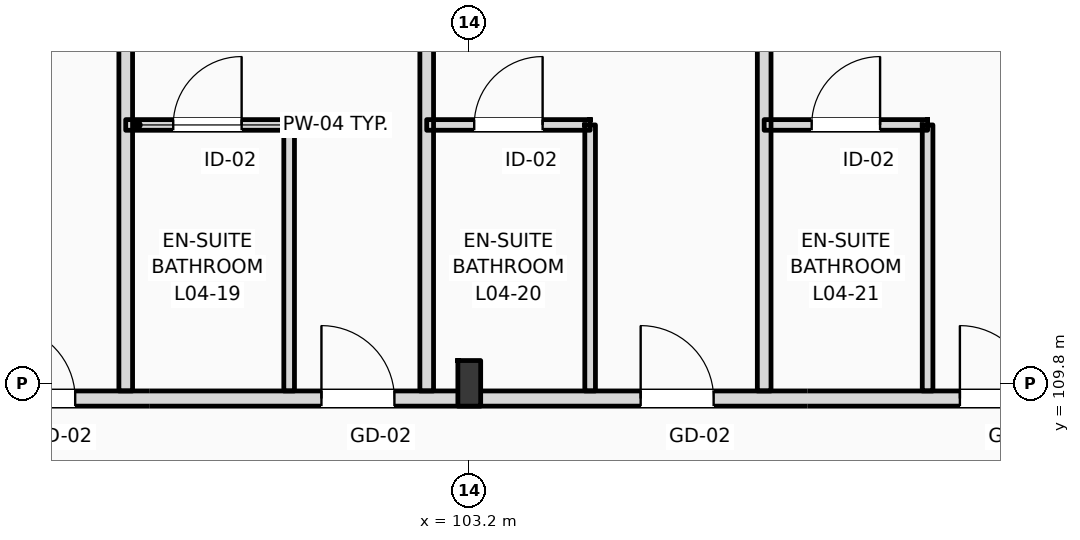
"""IFC4 building model, lengths in metres.
Left out: names, types, materials, properties, quantities, classifications, styles, units other than length and angle.
Written with IfcOpenShell. Run it as: python <this file> out.ifc"""

import sys

from ifc_helpers import new_model, si_unit, direction, frame, frame_2d, origin, origin_2d, place, context, subcontext, project, spatial, rectangle, i_section, extrude, element, fill, save


model = new_model("IFC4")
c1 = context("Model", 3, precision=1e-05, world=origin(), true_north=direction((0.0, 1.0)))
c2 = subcontext(c1, "Body", "Model", "MODEL_VIEW")
j1 = project(units=[si_unit("LENGTHUNIT", "METRE"), si_unit("PLANEANGLEUNIT", "RADIAN")], contexts=[c1])
p1 = place(None, origin())
s1 = spatial("IfcSite", under=j1, at=p1, CompositionType="ELEMENT")
p2 = place(p1, origin())
s2 = spatial("IfcBuilding", under=s1, at=p2, CompositionType="ELEMENT")
p3 = place(p2, frame((0.0, 0.0, 20.4)))
s3 = spatial("IfcBuildingStorey", under=s2, at=p3, CompositionType="ELEMENT", Elevation=20.4)
p4 = place(p3, frame((103.2, 109.8, 0.0), z_axis=(0.0, 0.0, 1.0), x_axis=(1.0, 0.0, 0.0)))
e1 = element("IfcColumn", 1, at=p4, inside=s3, PredefinedType="COLUMN", context=c2, shape_type="SweptSolid", body=[
    extrude(i_section(OverallWidth=0.3, OverallDepth=0.6, WebThickness=0.015, FlangeThickness=0.03, FilletRadius=0.027, at=origin_2d()), origin(), (0.0, 0.0, 1.0), 4.2),
])
p5 = place(p3, frame((10.65, 109.6, 0.0), z_axis=(0.0, 0.0, 1.0), x_axis=(1.0, 0.0, 0.0)))
e2 = element("IfcWall", 2, at=p5, inside=s3, PredefinedType="PARTITIONING", context=c2, shape_type="SweptSolid", body=[
    extrude(rectangle(XDim=109.21, YDim=0.2, at=frame_2d((54.605, 0.0))), origin(), (0.0, 0.0, 1.0), 3.38),
])
p6 = place(p5, frame((12.535, 0.0, 0.0)))
e3 = element("IfcOpeningElement", 3, at=p6, cuts=e2, PredefinedType="OPENING", context=c2, shape_type="SweptSolid", body=[
    extrude(rectangle(XDim=1.02, YDim=2.2, at=frame_2d((0.51, 1.1))), frame((0.0, 0.11, 0.0), z_axis=(0.0, -1.0, 0.0), x_axis=(1.0, 0.0, 0.0)), (0.0, 0.0, 1.0), 0.22),
])
p7 = place(p5, frame((19.175, 0.0, 0.0)))
e4 = element("IfcOpeningElement", 4, at=p7, cuts=e2, PredefinedType="OPENING", context=c2, shape_type="SweptSolid", body=[
    extrude(rectangle(XDim=1.02, YDim=2.2, at=frame_2d((0.51, 1.1))), frame((0.0, 0.11, 0.0), z_axis=(0.0, -1.0, 0.0), x_axis=(1.0, 0.0, 0.0)), (0.0, 0.0, 1.0), 0.22),
])
p8 = place(p5, frame((23.375, 0.0, 0.0)))
e5 = element("IfcOpeningElement", 5, at=p8, cuts=e2, PredefinedType="OPENING", context=c2, shape_type="SweptSolid", body=[
    extrude(rectangle(XDim=1.02, YDim=2.2, at=frame_2d((0.51, 1.1))), frame((0.0, 0.11, 0.0), z_axis=(0.0, -1.0, 0.0), x_axis=(1.0, 0.0, 0.0)), (0.0, 0.0, 1.0), 0.22),
])
p9 = place(p5, frame((27.575, 0.0, 0.0)))
e6 = element("IfcOpeningElement", 6, at=p9, cuts=e2, PredefinedType="OPENING", context=c2, shape_type="SweptSolid", body=[
    extrude(rectangle(XDim=1.02, YDim=2.2, at=frame_2d((0.51, 1.1))), frame((0.0, 0.11, 0.0), z_axis=(0.0, -1.0, 0.0), x_axis=(1.0, 0.0, 0.0)), (0.0, 0.0, 1.0), 0.22),
])
p10 = place(p5, frame((31.805, 0.0, 0.0)))
e7 = element("IfcOpeningElement", 7, at=p10, cuts=e2, PredefinedType="OPENING", context=c2, shape_type="SweptSolid", body=[
    extrude(rectangle(XDim=0.96, YDim=2.2, at=frame_2d((0.48, 1.1))), frame((0.0, 0.11, 0.0), z_axis=(0.0, -1.0, 0.0), x_axis=(1.0, 0.0, 0.0)), (0.0, 0.0, 1.0), 0.22),
])
p11 = place(p5, frame((33.855, 0.0, 0.0)))
e8 = element("IfcOpeningElement", 8, at=p11, cuts=e2, PredefinedType="OPENING", context=c2, shape_type="SweptSolid", body=[
    extrude(rectangle(XDim=0.96, YDim=2.2, at=frame_2d((0.48, 1.1))), frame((0.0, 0.11, 0.0), z_axis=(0.0, -1.0, 0.0), x_axis=(1.0, 0.0, 0.0)), (0.0, 0.0, 1.0), 0.22),
])
p12 = place(p5, frame((40.205, 0.0, 0.0)))
e9 = element("IfcOpeningElement", 9, at=p12, cuts=e2, PredefinedType="OPENING", context=c2, shape_type="SweptSolid", body=[
    extrude(rectangle(XDim=0.96, YDim=2.2, at=frame_2d((0.48, 1.1))), frame((0.0, 0.11, 0.0), z_axis=(0.0, -1.0, 0.0), x_axis=(1.0, 0.0, 0.0)), (0.0, 0.0, 1.0), 0.22),
])
p13 = place(p5, frame((42.255, 0.0, 0.0)))
e10 = element("IfcOpeningElement", 10, at=p13, cuts=e2, PredefinedType="OPENING", context=c2, shape_type="SweptSolid", body=[
    extrude(rectangle(XDim=0.96, YDim=2.2, at=frame_2d((0.48, 1.1))), frame((0.0, 0.11, 0.0), z_axis=(0.0, -1.0, 0.0), x_axis=(1.0, 0.0, 0.0)), (0.0, 0.0, 1.0), 0.22),
])
p14 = place(p5, frame((48.605, 0.0, 0.0)))
e11 = element("IfcOpeningElement", 11, at=p14, cuts=e2, PredefinedType="OPENING", context=c2, shape_type="SweptSolid", body=[
    extrude(rectangle(XDim=0.96, YDim=2.2, at=frame_2d((0.48, 1.1))), frame((0.0, 0.11, 0.0), z_axis=(0.0, -1.0, 0.0), x_axis=(1.0, 0.0, 0.0)), (0.0, 0.0, 1.0), 0.22),
])
p15 = place(p5, frame((50.655, 0.0, 0.0)))
e12 = element("IfcOpeningElement", 12, at=p15, cuts=e2, PredefinedType="OPENING", context=c2, shape_type="SweptSolid", body=[
    extrude(rectangle(XDim=0.96, YDim=2.2, at=frame_2d((0.48, 1.1))), frame((0.0, 0.11, 0.0), z_axis=(0.0, -1.0, 0.0), x_axis=(1.0, 0.0, 0.0)), (0.0, 0.0, 1.0), 0.22),
])
p16 = place(p5, frame((57.005, 0.0, 0.0)))
e13 = element("IfcOpeningElement", 13, at=p16, cuts=e2, PredefinedType="OPENING", context=c2, shape_type="SweptSolid", body=[
    extrude(rectangle(XDim=0.96, YDim=2.2, at=frame_2d((0.48, 1.1))), frame((0.0, 0.11, 0.0), z_axis=(0.0, -1.0, 0.0), x_axis=(1.0, 0.0, 0.0)), (0.0, 0.0, 1.0), 0.22),
])
p17 = place(p5, frame((59.055, 0.0, 0.0)))
e14 = element("IfcOpeningElement", 14, at=p17, cuts=e2, PredefinedType="OPENING", context=c2, shape_type="SweptSolid", body=[
    extrude(rectangle(XDim=0.96, YDim=2.2, at=frame_2d((0.48, 1.1))), frame((0.0, 0.11, 0.0), z_axis=(0.0, -1.0, 0.0), x_axis=(1.0, 0.0, 0.0)), (0.0, 0.0, 1.0), 0.22),
])
p18 = place(p5, frame((65.405, 0.0, 0.0)))
e15 = element("IfcOpeningElement", 15, at=p18, cuts=e2, PredefinedType="OPENING", context=c2, shape_type="SweptSolid", body=[
    extrude(rectangle(XDim=0.96, YDim=2.2, at=frame_2d((0.48, 1.1))), frame((0.0, 0.11, 0.0), z_axis=(0.0, -1.0, 0.0), x_axis=(1.0, 0.0, 0.0)), (0.0, 0.0, 1.0), 0.22),
])
p19 = place(p5, frame((67.205, 0.0, 0.0)))
e16 = element("IfcOpeningElement", 16, at=p19, cuts=e2, PredefinedType="OPENING", context=c2, shape_type="SweptSolid", body=[
    extrude(rectangle(XDim=0.96, YDim=2.2, at=frame_2d((0.48, 1.1))), frame((0.0, 0.11, 0.0), z_axis=(0.0, -1.0, 0.0), x_axis=(1.0, 0.0, 0.0)), (0.0, 0.0, 1.0), 0.22),
])
p20 = place(p5, frame((73.805, 0.0, 0.0)))
e17 = element("IfcOpeningElement", 17, at=p20, cuts=e2, PredefinedType="OPENING", context=c2, shape_type="SweptSolid", body=[
    extrude(rectangle(XDim=0.96, YDim=2.2, at=frame_2d((0.48, 1.1))), frame((0.0, 0.11, 0.0), z_axis=(0.0, -1.0, 0.0), x_axis=(1.0, 0.0, 0.0)), (0.0, 0.0, 1.0), 0.22),
])
p21 = place(p5, frame((78.255, 0.0, 0.0)))
e18 = element("IfcOpeningElement", 18, at=p21, cuts=e2, PredefinedType="OPENING", context=c2, shape_type="SweptSolid", body=[
    extrude(rectangle(XDim=0.96, YDim=2.2, at=frame_2d((0.48, 1.1))), frame((0.0, 0.11, 0.0), z_axis=(0.0, -1.0, 0.0), x_axis=(1.0, 0.0, 0.0)), (0.0, 0.0, 1.0), 0.22),
])
p22 = place(p5, frame((82.205, 0.0, 0.0)))
e19 = element("IfcOpeningElement", 19, at=p22, cuts=e2, PredefinedType="OPENING", context=c2, shape_type="SweptSolid", body=[
    extrude(rectangle(XDim=0.96, YDim=2.2, at=frame_2d((0.48, 1.1))), frame((0.0, 0.11, 0.0), z_axis=(0.0, -1.0, 0.0), x_axis=(1.0, 0.0, 0.0)), (0.0, 0.0, 1.0), 0.22),
])
p23 = place(p5, frame((86.405, 0.0, 0.0)))
e20 = element("IfcOpeningElement", 20, at=p23, cuts=e2, PredefinedType="OPENING", context=c2, shape_type="SweptSolid", body=[
    extrude(rectangle(XDim=0.96, YDim=2.2, at=frame_2d((0.48, 1.1))), frame((0.0, 0.11, 0.0), z_axis=(0.0, -1.0, 0.0), x_axis=(1.0, 0.0, 0.0)), (0.0, 0.0, 1.0), 0.22),
])
p24 = place(p5, frame((90.605, 0.0, 0.0)))
e21 = element("IfcOpeningElement", 21, at=p24, cuts=e2, PredefinedType="OPENING", context=c2, shape_type="SweptSolid", body=[
    extrude(rectangle(XDim=0.96, YDim=2.2, at=frame_2d((0.48, 1.1))), frame((0.0, 0.11, 0.0), z_axis=(0.0, -1.0, 0.0), x_axis=(1.0, 0.0, 0.0)), (0.0, 0.0, 1.0), 0.22),
])
p25 = place(p5, frame((94.805, 0.0, 0.0)))
e22 = element("IfcOpeningElement", 22, at=p25, cuts=e2, PredefinedType="OPENING", context=c2, shape_type="SweptSolid", body=[
    extrude(rectangle(XDim=0.96, YDim=2.2, at=frame_2d((0.48, 1.1))), frame((0.0, 0.11, 0.0), z_axis=(0.0, -1.0, 0.0), x_axis=(1.0, 0.0, 0.0)), (0.0, 0.0, 1.0), 0.22),
])
p26 = place(p5, frame((99.005, 0.0, 0.0)))
e23 = element("IfcOpeningElement", 23, at=p26, cuts=e2, PredefinedType="OPENING", context=c2, shape_type="SweptSolid", body=[
    extrude(rectangle(XDim=0.96, YDim=2.2, at=frame_2d((0.48, 1.1))), frame((0.0, 0.11, 0.0), z_axis=(0.0, -1.0, 0.0), x_axis=(1.0, 0.0, 0.0)), (0.0, 0.0, 1.0), 0.22),
])
p27 = place(p5, frame((103.205, 0.0, 0.0)))
e24 = element("IfcOpeningElement", 24, at=p27, cuts=e2, PredefinedType="OPENING", context=c2, shape_type="SweptSolid", body=[
    extrude(rectangle(XDim=0.96, YDim=2.2, at=frame_2d((0.48, 1.1))), frame((0.0, 0.11, 0.0), z_axis=(0.0, -1.0, 0.0), x_axis=(1.0, 0.0, 0.0)), (0.0, 0.0, 1.0), 0.22),
])
p28 = place(p5, frame((105.335, 0.0, 0.0)))
e25 = element("IfcOpeningElement", 25, at=p28, cuts=e2, PredefinedType="OPENING", context=c2, shape_type="SweptSolid", body=[
    extrude(rectangle(XDim=0.96, YDim=2.2, at=frame_2d((0.48, 1.1))), frame((0.0, 0.11, 0.0), z_axis=(0.0, -1.0, 0.0), x_axis=(1.0, 0.0, 0.0)), (0.0, 0.0, 1.0), 0.22),
])
p29 = place(p5, frame((2.716, 0.0, 0.0)))
e26 = element("IfcOpeningElement", 26, at=p29, cuts=e2, PredefinedType="OPENING", context=c2, shape_type="SweptSolid", body=[
    extrude(rectangle(XDim=1.35, YDim=2.25, at=frame_2d((0.675, 1.125))), frame((0.0, 0.11, 0.0), z_axis=(0.0, -1.0, 0.0), x_axis=(1.0, 0.0, 0.0)), (0.0, 0.0, 1.0), 0.22),
])
p30 = place(p5, frame((6.65, 0.0, 0.0)))
e27 = element("IfcOpeningElement", 27, at=p30, cuts=e2, PredefinedType="OPENING", context=c2, shape_type="SweptSolid", body=[
    extrude(rectangle(XDim=1.35, YDim=2.25, at=frame_2d((0.675, 1.125))), frame((0.0, 0.11, 0.0), z_axis=(0.0, -1.0, 0.0), x_axis=(1.0, 0.0, 0.0)), (0.0, 0.0, 1.0), 0.22),
])
p31 = place(p5, frame((10.583, 0.0, 0.0)))
e28 = element("IfcOpeningElement", 28, at=p31, cuts=e2, PredefinedType="OPENING", context=c2, shape_type="SweptSolid", body=[
    extrude(rectangle(XDim=1.35, YDim=2.25, at=frame_2d((0.675, 1.125))), frame((0.0, 0.11, 0.0), z_axis=(0.0, -1.0, 0.0), x_axis=(1.0, 0.0, 0.0)), (0.0, 0.0, 1.0), 0.22),
])
for number, where, z_axis, x_axis in (
    (29, (98.68, 109.7, 0.0), (0.0, 0.0, 1.0), (0.0, 1.0, 0.0)),
    (30, (102.64, 109.7, 0.0), (0.0, 0.0, 1.0), (0.0, 1.0, 0.0)),
):
    element("IfcWall", number, at=place(p3, frame(where, z_axis=z_axis, x_axis=x_axis)), inside=s3, PredefinedType="PARTITIONING", context=c2, shape_type="SweptSolid", body=[
        extrude(rectangle(XDim=8.15, YDim=0.18, at=frame_2d((4.075, 0.0))), origin(), (0.0, 0.0, 1.0), 3.94),
    ])
p32 = place(p3, frame((100.83, 109.7, 0.0), z_axis=(0.0, 0.0, 1.0), x_axis=(0.0, 1.0, 0.0)))
e31 = element("IfcWall", 31, at=p32, inside=s3, PredefinedType="PARTITIONING", context=c2, shape_type="SweptSolid", body=[
    extrude(rectangle(XDim=3.5, YDim=0.14, at=frame_2d((1.75, 0.0))), origin(), (0.0, 0.0, 1.0), 3.94),
])
p33 = place(p3, frame((98.68, 113.2, 0.0), z_axis=(0.0, 0.0, 1.0), x_axis=(1.0, 0.0, 0.0)))
e32 = element("IfcWall", 32, at=p33, inside=s3, PredefinedType="PARTITIONING", context=c2, shape_type="SweptSolid", body=[
    extrude(rectangle(XDim=2.15, YDim=0.14, at=frame_2d((1.075, 0.0))), origin(), (0.0, 0.0, 1.0), 3.94),
])
p34 = place(p33, frame((0.625, 0.0, 0.0)))
e33 = element("IfcOpeningElement", 33, at=p34, cuts=e32, PredefinedType="OPENING", context=c2, shape_type="SweptSolid", body=[
    extrude(rectangle(XDim=0.9, YDim=2.1, at=frame_2d((0.45, 1.05))), frame((0.0, 0.08, 0.0), z_axis=(0.0, -1.0, 0.0), x_axis=(1.0, 0.0, 0.0)), (0.0, 0.0, 1.0), 0.16),
])
p35 = place(p3, frame((107.08, 109.7, 0.0), z_axis=(0.0, 0.0, 1.0), x_axis=(0.0, 1.0, 0.0)))
e34 = element("IfcWall", 34, at=p35, inside=s3, PredefinedType="PARTITIONING", context=c2, shape_type="SweptSolid", body=[
    extrude(rectangle(XDim=8.15, YDim=0.18, at=frame_2d((4.075, 0.0))), origin(), (0.0, 0.0, 1.0), 3.94),
])
p36 = place(p3, frame((104.79, 109.7, 0.0), z_axis=(0.0, 0.0, 1.0), x_axis=(0.0, 1.0, 0.0)))
e35 = element("IfcWall", 35, at=p36, inside=s3, PredefinedType="PARTITIONING", context=c2, shape_type="SweptSolid", body=[
    extrude(rectangle(XDim=3.5, YDim=0.14, at=frame_2d((1.75, 0.0))), origin(), (0.0, 0.0, 1.0), 3.94),
])
p37 = place(p3, frame((102.64, 113.2, 0.0), z_axis=(0.0, 0.0, 1.0), x_axis=(1.0, 0.0, 0.0)))
e36 = element("IfcWall", 36, at=p37, inside=s3, PredefinedType="PARTITIONING", context=c2, shape_type="SweptSolid", body=[
    extrude(rectangle(XDim=2.15, YDim=0.14, at=frame_2d((1.075, 0.0))), origin(), (0.0, 0.0, 1.0), 3.94),
])
p38 = place(p37, frame((0.625, 0.0, 0.0)))
e37 = element("IfcOpeningElement", 37, at=p38, cuts=e36, PredefinedType="OPENING", context=c2, shape_type="SweptSolid", body=[
    extrude(rectangle(XDim=0.9, YDim=2.1, at=frame_2d((0.45, 1.05))), frame((0.0, 0.08, 0.0), z_axis=(0.0, -1.0, 0.0), x_axis=(1.0, 0.0, 0.0)), (0.0, 0.0, 1.0), 0.16),
])
p39 = place(p3, frame((109.23, 109.7, 0.0), z_axis=(0.0, 0.0, 1.0), x_axis=(0.0, 1.0, 0.0)))
e38 = element("IfcWall", 38, at=p39, inside=s3, PredefinedType="PARTITIONING", context=c2, shape_type="SweptSolid", body=[
    extrude(rectangle(XDim=3.5, YDim=0.14, at=frame_2d((1.75, 0.0))), origin(), (0.0, 0.0, 1.0), 3.94),
])
p40 = place(p3, frame((107.08, 113.2, 0.0), z_axis=(0.0, 0.0, 1.0), x_axis=(1.0, 0.0, 0.0)))
e39 = element("IfcWall", 39, at=p40, inside=s3, PredefinedType="PARTITIONING", context=c2, shape_type="SweptSolid", body=[
    extrude(rectangle(XDim=2.15, YDim=0.14, at=frame_2d((1.075, 0.0))), origin(), (0.0, 0.0, 1.0), 3.94),
])
p41 = place(p40, frame((0.625, 0.0, 0.0)))
e40 = element("IfcOpeningElement", 40, at=p41, cuts=e39, PredefinedType="OPENING", context=c2, shape_type="SweptSolid", body=[
    extrude(rectangle(XDim=0.9, YDim=2.1, at=frame_2d((0.45, 1.05))), frame((0.0, 0.08, 0.0), z_axis=(0.0, -1.0, 0.0), x_axis=(1.0, 0.0, 0.0)), (0.0, 0.0, 1.0), 0.16),
])
p42 = place(p23, origin())
e41 = element("IfcDoor", 41, at=p42, inside=s3, OperationType="SINGLE_SWING_LEFT", PredefinedType="DOOR", context=c2, shape_type="SweptSolid", body=[
    extrude(rectangle(XDim=0.96, YDim=2.2, at=frame_2d((0.48, 1.1))), frame((0.0, 0.025, 0.0), z_axis=(0.0, -1.0, 0.0), x_axis=(1.0, 0.0, 0.0)), (0.0, 0.0, 1.0), 0.05),
])
fill(e20, e41)
p43 = place(p24, origin())
e42 = element("IfcDoor", 42, at=p43, inside=s3, OperationType="SINGLE_SWING_LEFT", PredefinedType="DOOR", context=c2, shape_type="SweptSolid", body=[
    extrude(rectangle(XDim=0.96, YDim=2.2, at=frame_2d((0.48, 1.1))), frame((0.0, 0.025, 0.0), z_axis=(0.0, -1.0, 0.0), x_axis=(1.0, 0.0, 0.0)), (0.0, 0.0, 1.0), 0.05),
])
fill(e21, e42)
p44 = place(p34, origin())
e43 = element("IfcDoor", 43, at=p44, inside=s3, OperationType="SINGLE_SWING_RIGHT", PredefinedType="DOOR", context=c2, shape_type="SweptSolid", body=[
    extrude(rectangle(XDim=0.9, YDim=2.1, at=frame_2d((0.45, 1.05))), frame((0.0, 0.025, 0.0), z_axis=(0.0, -1.0, 0.0), x_axis=(1.0, 0.0, 0.0)), (0.0, 0.0, 1.0), 0.05),
])
fill(e33, e43)
p45 = place(p25, origin())
e44 = element("IfcDoor", 44, at=p45, inside=s3, OperationType="SINGLE_SWING_LEFT", PredefinedType="DOOR", context=c2, shape_type="SweptSolid", body=[
    extrude(rectangle(XDim=0.96, YDim=2.2, at=frame_2d((0.48, 1.1))), frame((0.0, 0.025, 0.0), z_axis=(0.0, -1.0, 0.0), x_axis=(1.0, 0.0, 0.0)), (0.0, 0.0, 1.0), 0.05),
])
fill(e22, e44)
p46 = place(p38, origin())
e45 = element("IfcDoor", 45, at=p46, inside=s3, OperationType="SINGLE_SWING_RIGHT", PredefinedType="DOOR", context=c2, shape_type="SweptSolid", body=[
    extrude(rectangle(XDim=0.9, YDim=2.1, at=frame_2d((0.45, 1.05))), frame((0.0, 0.025, 0.0), z_axis=(0.0, -1.0, 0.0), x_axis=(1.0, 0.0, 0.0)), (0.0, 0.0, 1.0), 0.05),
])
fill(e37, e45)
p47 = place(p26, origin())
e46 = element("IfcDoor", 46, at=p47, inside=s3, OperationType="SINGLE_SWING_LEFT", PredefinedType="DOOR", context=c2, shape_type="SweptSolid", body=[
    extrude(rectangle(XDim=0.96, YDim=2.2, at=frame_2d((0.48, 1.1))), frame((0.0, 0.025, 0.0), z_axis=(0.0, -1.0, 0.0), x_axis=(1.0, 0.0, 0.0)), (0.0, 0.0, 1.0), 0.05),
])
fill(e23, e46)
p48 = place(p41, origin())
e47 = element("IfcDoor", 47, at=p48, inside=s3, OperationType="SINGLE_SWING_RIGHT", PredefinedType="DOOR", context=c2, shape_type="SweptSolid", body=[
    extrude(rectangle(XDim=0.9, YDim=2.1, at=frame_2d((0.45, 1.05))), frame((0.0, 0.025, 0.0), z_axis=(0.0, -1.0, 0.0), x_axis=(1.0, 0.0, 0.0)), (0.0, 0.0, 1.0), 0.05),
])
fill(e40, e47)
save(model, sys.argv[1])
